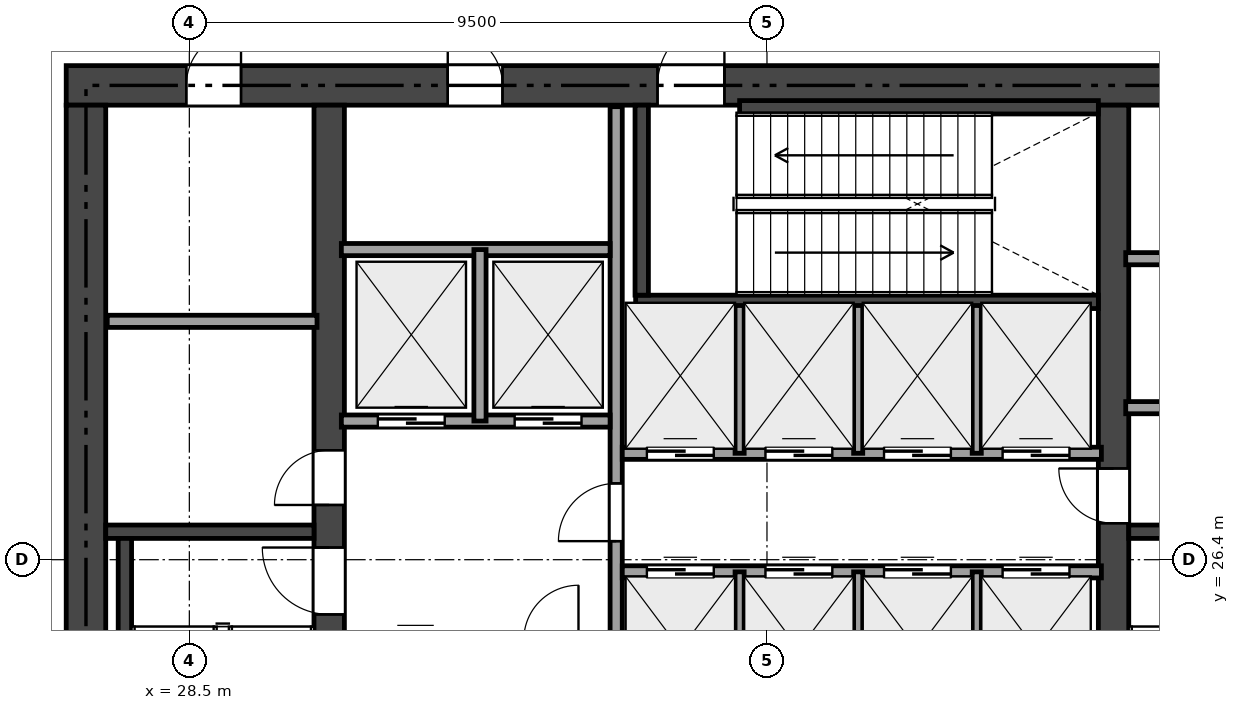
"""IFC4 building model, lengths in metres.
Left out: names, types, materials, properties, quantities, classifications, styles, units other than length and angle.
Written with IfcOpenShell. Run it as: python <this file> out.ifc"""

import sys

from ifc_helpers import new_model, si_unit, direction, frame, frame_2d, origin, place, context, subcontext, project, spatial, rectangle, extrude, element, fill, save


model = new_model("IFC4")
c1 = context("Model", 3, precision=1e-05, world=origin(), true_north=direction((0.0, 1.0)))
c2 = subcontext(c1, "Body", "Model", "MODEL_VIEW")
j1 = project(units=[si_unit("LENGTHUNIT", "METRE"), si_unit("PLANEANGLEUNIT", "RADIAN")], contexts=[c1])
p1 = place(None, origin())
s1 = spatial("IfcSite", under=j1, at=p1, CompositionType="ELEMENT")
p2 = place(p1, origin())
s2 = spatial("IfcBuilding", under=s1, at=p2, CompositionType="ELEMENT")
p3 = place(p2, origin())
s3 = spatial("IfcBuildingStorey", under=s2, at=p3, CompositionType="ELEMENT", Elevation=0.0)
p4 = place(p3, frame((26.475, 34.2, 0.0), z_axis=(0.0, 0.0, 1.0), x_axis=(1.0, 0.0, 0.0)))
e1 = element("IfcWall", 1, at=p4, inside=s3, PredefinedType="SHEAR", context=c2, shape_type="SweptSolid", body=[
    extrude(rectangle(XDim=21.45, YDim=0.65, at=frame_2d((10.725, 0.0))), origin(), (0.0, 0.0, 1.0), 5.05),
])
p5 = place(p4, frame((9.725, 0.0, 0.0)))
e2 = element("IfcOpeningElement", 2, at=p5, cuts=e1, PredefinedType="OPENING", context=c2, shape_type="SweptSolid", body=[
    extrude(rectangle(XDim=1.1, YDim=2.15, at=frame_2d((0.55, 1.075))), frame((0.0, 0.335, 0.0), z_axis=(0.0, -1.0, 0.0), x_axis=(1.0, 0.0, 0.0)), (0.0, 0.0, 1.0), 0.67),
])
p6 = place(p4, frame((1.975, 0.0, 0.0)))
e3 = element("IfcOpeningElement", 3, at=p6, cuts=e1, PredefinedType="OPENING", context=c2, shape_type="SweptSolid", body=[
    extrude(rectangle(XDim=0.9, YDim=2.1, at=frame_2d((0.45, 1.05))), frame((0.0, 0.335, 0.0), z_axis=(0.0, -1.0, 0.0), x_axis=(1.0, 0.0, 0.0)), (0.0, 0.0, 1.0), 0.67),
])
p7 = place(p4, frame((6.275, 0.0, 0.0)))
e4 = element("IfcOpeningElement", 4, at=p7, cuts=e1, PredefinedType="OPENING", context=c2, shape_type="SweptSolid", body=[
    extrude(rectangle(XDim=0.9, YDim=2.1, at=frame_2d((0.45, 1.05))), frame((0.0, 0.335, 0.0), z_axis=(0.0, -1.0, 0.0), x_axis=(1.0, 0.0, 0.0)), (0.0, 0.0, 1.0), 0.67),
])
p8 = place(p3, frame((26.8, 18.925, 0.0), z_axis=(0.0, 0.0, 1.0), x_axis=(0.0, 1.0, 0.0)))
e5 = element("IfcWall", 5, at=p8, inside=s3, PredefinedType="SHEAR", context=c2, shape_type="SweptSolid", body=[
    extrude(rectangle(XDim=14.95, YDim=0.65, at=frame_2d((7.475, 0.0))), origin(), (0.0, 0.0, 1.0), 5.05),
])
p9 = place(p3, frame((30.8, 18.925, 0.0), z_axis=(0.0, 0.0, 1.0), x_axis=(0.0, 1.0, 0.0)))
e6 = element("IfcWall", 6, at=p9, inside=s3, PredefinedType="SHEAR", context=c2, shape_type="SweptSolid", body=[
    extrude(rectangle(XDim=14.95, YDim=0.5, at=frame_2d((7.475, 0.0))), origin(), (0.0, 0.0, 1.0), 5.05),
])
p10 = place(p9, frame((6.575, 0.0, 0.0)))
e7 = element("IfcOpeningElement", 7, at=p10, cuts=e6, PredefinedType="OPENING", context=c2, shape_type="SweptSolid", body=[
    extrude(rectangle(XDim=1.1, YDim=2.15, at=frame_2d((0.55, 1.075))), frame((0.0, 0.26, 0.0), z_axis=(0.0, -1.0, 0.0), x_axis=(1.0, 0.0, 0.0)), (0.0, 0.0, 1.0), 0.52),
])
p11 = place(p9, frame((8.375, 0.0, 0.0)))
e8 = element("IfcOpeningElement", 8, at=p11, cuts=e6, PredefinedType="OPENING", context=c2, shape_type="SweptSolid", body=[
    extrude(rectangle(XDim=0.9, YDim=2.1, at=frame_2d((0.45, 1.05))), frame((0.0, 0.26, 0.0), z_axis=(0.0, -1.0, 0.0), x_axis=(1.0, 0.0, 0.0)), (0.0, 0.0, 1.0), 0.52),
])
p12 = place(p3, frame((43.7, 18.925, 0.0), z_axis=(0.0, 0.0, 1.0), x_axis=(0.0, 1.0, 0.0)))
e9 = element("IfcWall", 9, at=p12, inside=s3, PredefinedType="SHEAR", context=c2, shape_type="SweptSolid", body=[
    extrude(rectangle(XDim=14.95, YDim=0.5, at=frame_2d((7.475, 0.0))), origin(), (0.0, 0.0, 1.0), 5.05),
])
p13 = place(p12, frame((8.075, 0.0, 0.0)))
e10 = element("IfcOpeningElement", 10, at=p13, cuts=e9, PredefinedType="OPENING", context=c2, shape_type="SweptSolid", body=[
    extrude(rectangle(XDim=0.9, YDim=2.1, at=frame_2d((0.45, 1.05))), frame((0.0, 0.26, 0.0), z_axis=(0.0, -1.0, 0.0), x_axis=(1.0, 0.0, 0.0)), (0.0, 0.0, 1.0), 0.52),
])
p14 = place(p3, frame((27.125, 26.86, 0.0), z_axis=(0.0, 0.0, 1.0), x_axis=(1.0, 0.0, 0.0)))
e11 = element("IfcWall", 11, at=p14, inside=s3, PredefinedType="SHEAR", context=c2, shape_type="SweptSolid", body=[
    extrude(rectangle(XDim=3.425, YDim=0.22, at=frame_2d((1.712, 0.0))), origin(), (0.0, 0.0, 1.0), 5.05),
])
p15 = place(p3, frame((27.44, 19.35, 0.0), z_axis=(0.0, 0.0, 1.0), x_axis=(0.0, 1.0, 0.0)))
e12 = element("IfcWall", 12, at=p15, inside=s3, PredefinedType="SHEAR", context=c2, shape_type="SweptSolid", body=[
    extrude(rectangle(XDim=7.4, YDim=0.22, at=frame_2d((3.7, 0.0))), origin(), (0.0, 0.0, 1.0), 5.05),
])
p16 = place(p3, frame((43.95, 26.86, 0.0), z_axis=(0.0, 0.0, 1.0), x_axis=(1.0, 0.0, 0.0)))
e13 = element("IfcWall", 13, at=p16, inside=s3, PredefinedType="SHEAR", context=c2, shape_type="SweptSolid", body=[
    extrude(rectangle(XDim=3.325, YDim=0.22, at=frame_2d((1.663, 0.0))), origin(), (0.0, 0.0, 1.0), 5.05),
])
p17 = place(p3, frame((35.84, 30.64, 0.0), z_axis=(0.0, 0.0, 1.0), x_axis=(1.0, 0.0, 0.0)))
e14 = element("IfcWall", 14, at=p17, inside=s3, PredefinedType="SHEAR", context=c2, shape_type="SweptSolid", body=[
    extrude(rectangle(XDim=7.61, YDim=0.22, at=frame_2d((3.805, 0.0))), origin(), (0.0, 0.0, 1.0), 5.05),
])
p18 = place(p3, frame((35.94, 30.75, 0.0), z_axis=(0.0, 0.0, 1.0), x_axis=(0.0, 1.0, 0.0)))
e15 = element("IfcWall", 15, at=p18, inside=s3, PredefinedType="SHEAR", context=c2, shape_type="SweptSolid", body=[
    extrude(rectangle(XDim=3.125, YDim=0.22, at=frame_2d((1.562, 0.0))), origin(), (0.0, 0.0, 1.0), 5.05),
])
p19 = place(p3, frame((37.55, 33.84, 0.0), z_axis=(0.0, 0.0, 1.0), x_axis=(1.0, 0.0, 0.0)))
e16 = element("IfcWall", 16, at=p19, inside=s3, PredefinedType="SHEAR", context=c2, shape_type="SweptSolid", body=[
    extrude(rectangle(XDim=5.9, YDim=0.22, at=frame_2d((2.95, 0.0))), origin(), (0.0, 0.0, 1.0), 5.05),
])
p20 = place(p3, frame((27.15, 30.32, 0.0), z_axis=(0.0, 0.0, 1.0), x_axis=(1.0, 0.0, 0.0)))
e17 = element("IfcWall", 17, at=p20, inside=s3, PredefinedType="SOLIDWALL", context=c2, shape_type="SweptSolid", body=[
    extrude(rectangle(XDim=3.45, YDim=0.2, at=frame_2d((1.725, 0.0))), origin(), (0.0, 0.0, 1.0), 5.05),
])
p21 = place(p3, frame((43.9, 28.9, 0.0), z_axis=(0.0, 0.0, 1.0), x_axis=(1.0, 0.0, 0.0)))
e18 = element("IfcWall", 18, at=p21, inside=s3, PredefinedType="SOLIDWALL", context=c2, shape_type="SweptSolid", body=[
    extrude(rectangle(XDim=3.35, YDim=0.2, at=frame_2d((1.675, 0.0))), origin(), (0.0, 0.0, 1.0), 5.05),
])
p22 = place(p21, frame((1.15, 0.0, 0.0)))
e19 = element("IfcOpeningElement", 19, at=p22, cuts=e18, PredefinedType="OPENING", context=c2, shape_type="SweptSolid", body=[
    extrude(rectangle(XDim=0.9, YDim=2.1, at=frame_2d((0.45, 1.05))), frame((0.0, 0.11, 0.0), z_axis=(0.0, -1.0, 0.0), x_axis=(1.0, 0.0, 0.0)), (0.0, 0.0, 1.0), 0.22),
])
p23 = place(p3, frame((43.9, 31.35, 0.0), z_axis=(0.0, 0.0, 1.0), x_axis=(1.0, 0.0, 0.0)))
e20 = element("IfcWall", 20, at=p23, inside=s3, PredefinedType="SOLIDWALL", context=c2, shape_type="SweptSolid", body=[
    extrude(rectangle(XDim=3.35, YDim=0.2, at=frame_2d((1.675, 0.0))), origin(), (0.0, 0.0, 1.0), 5.05),
])
p24 = place(p3, frame((35.52, 18.95, 0.0), z_axis=(0.0, 0.0, 1.0), x_axis=(0.0, 1.0, 0.0)))
e21 = element("IfcWall", 21, at=p24, inside=s3, PredefinedType="SOLIDWALL", context=c2, shape_type="SweptSolid", body=[
    extrude(rectangle(XDim=14.9, YDim=0.2, at=frame_2d((7.45, 0.0))), origin(), (0.0, 0.0, 1.0), 4.571),
])
p25 = place(p24, frame((7.755, 0.0, 0.0)))
e22 = element("IfcOpeningElement", 22, at=p25, cuts=e21, PredefinedType="OPENING", context=c2, shape_type="SweptSolid", body=[
    extrude(rectangle(XDim=0.95, YDim=2.15, at=frame_2d((0.475, 1.075))), frame((0.0, 0.11, 0.0), z_axis=(0.0, -1.0, 0.0), x_axis=(1.0, 0.0, 0.0)), (0.0, 0.0, 1.0), 0.22),
])
p26 = place(p24, frame((0.6, 0.0, 0.0)))
e23 = element("IfcOpeningElement", 23, at=p26, cuts=e21, PredefinedType="OPENING", context=c2, shape_type="SweptSolid", body=[
    extrude(rectangle(XDim=0.9, YDim=2.1, at=frame_2d((0.45, 1.05))), frame((0.0, 0.11, 0.0), z_axis=(0.0, -1.0, 0.0), x_axis=(1.0, 0.0, 0.0)), (0.0, 0.0, 1.0), 0.22),
])
p27 = place(p3, frame((31.0, 28.68, 0.0), z_axis=(0.0, 0.0, 1.0), x_axis=(1.0, 0.0, 0.0)))
e24 = element("IfcWall", 24, at=p27, inside=s3, PredefinedType="SOLIDWALL", context=c2, shape_type="SweptSolid", body=[
    extrude(rectangle(XDim=4.42, YDim=0.2, at=frame_2d((2.21, 0.0))), origin(), (0.0, 0.0, 1.0), 5.05),
])
p28 = place(p27, frame((0.6, 0.0, 0.0)))
e25 = element("IfcOpeningElement", 25, at=p28, cuts=e24, PredefinedType="OPENING", context=c2, shape_type="SweptSolid", body=[
    extrude(rectangle(XDim=1.1, YDim=2.15, at=frame_2d((0.55, 1.075))), frame((0.0, 0.11, 0.0), z_axis=(0.0, -1.0, 0.0), x_axis=(1.0, 0.0, 0.0)), (0.0, 0.0, 1.0), 0.22),
])
p29 = place(p27, frame((2.85, 0.0, 0.0)))
e26 = element("IfcOpeningElement", 26, at=p29, cuts=e24, PredefinedType="OPENING", context=c2, shape_type="SweptSolid", body=[
    extrude(rectangle(XDim=1.1, YDim=2.15, at=frame_2d((0.55, 1.075))), frame((0.0, 0.11, 0.0), z_axis=(0.0, -1.0, 0.0), x_axis=(1.0, 0.0, 0.0)), (0.0, 0.0, 1.0), 0.22),
])
p30 = place(p3, frame((31.0, 31.5, 0.0), z_axis=(0.0, 0.0, 1.0), x_axis=(1.0, 0.0, 0.0)))
e27 = element("IfcWall", 27, at=p30, inside=s3, PredefinedType="SOLIDWALL", context=c2, shape_type="SweptSolid", body=[
    extrude(rectangle(XDim=4.42, YDim=0.2, at=frame_2d((2.21, 0.0))), origin(), (0.0, 0.0, 1.0), 5.05),
])
p31 = place(p3, frame((33.28, 28.68, 0.0), z_axis=(0.0, 0.0, 1.0), x_axis=(0.0, 1.0, 0.0)))
e28 = element("IfcWall", 28, at=p31, inside=s3, PredefinedType="SOLIDWALL", context=c2, shape_type="SweptSolid", body=[
    extrude(rectangle(XDim=2.82, YDim=0.2, at=frame_2d((1.41, 0.0))), origin(), (0.0, 0.0, 1.0), 5.05),
])
p32 = place(p3, frame((35.62, 28.15, 0.0), z_axis=(0.0, 0.0, 1.0), x_axis=(1.0, 0.0, 0.0)))
e29 = element("IfcWall", 29, at=p32, inside=s3, PredefinedType="SOLIDWALL", context=c2, shape_type="SweptSolid", body=[
    extrude(rectangle(XDim=7.88, YDim=0.2, at=frame_2d((3.94, 0.0))), origin(), (0.0, 0.0, 1.0), 5.05),
])
p33 = place(p32, frame((0.405, 0.0, 0.0)))
e30 = element("IfcOpeningElement", 30, at=p33, cuts=e29, PredefinedType="OPENING", context=c2, shape_type="SweptSolid", body=[
    extrude(rectangle(XDim=1.1, YDim=2.15, at=frame_2d((0.55, 1.075))), frame((0.0, 0.11, 0.0), z_axis=(0.0, -1.0, 0.0), x_axis=(1.0, 0.0, 0.0)), (0.0, 0.0, 1.0), 0.22),
])
p34 = place(p32, frame((2.355, 0.0, 0.0)))
e31 = element("IfcOpeningElement", 31, at=p34, cuts=e29, PredefinedType="OPENING", context=c2, shape_type="SweptSolid", body=[
    extrude(rectangle(XDim=1.1, YDim=2.15, at=frame_2d((0.55, 1.075))), frame((0.0, 0.11, 0.0), z_axis=(0.0, -1.0, 0.0), x_axis=(1.0, 0.0, 0.0)), (0.0, 0.0, 1.0), 0.22),
])
p35 = place(p32, frame((4.305, 0.0, 0.0)))
e32 = element("IfcOpeningElement", 32, at=p35, cuts=e29, PredefinedType="OPENING", context=c2, shape_type="SweptSolid", body=[
    extrude(rectangle(XDim=1.1, YDim=2.15, at=frame_2d((0.55, 1.075))), frame((0.0, 0.11, 0.0), z_axis=(0.0, -1.0, 0.0), x_axis=(1.0, 0.0, 0.0)), (0.0, 0.0, 1.0), 0.22),
])
p36 = place(p32, frame((6.255, 0.0, 0.0)))
e33 = element("IfcOpeningElement", 33, at=p36, cuts=e29, PredefinedType="OPENING", context=c2, shape_type="SweptSolid", body=[
    extrude(rectangle(XDim=1.1, YDim=2.15, at=frame_2d((0.55, 1.075))), frame((0.0, 0.11, 0.0), z_axis=(0.0, -1.0, 0.0), x_axis=(1.0, 0.0, 0.0)), (0.0, 0.0, 1.0), 0.22),
])
p37 = place(p3, frame((35.62, 26.2, 0.0), z_axis=(0.0, 0.0, 1.0), x_axis=(1.0, 0.0, 0.0)))
e34 = element("IfcWall", 34, at=p37, inside=s3, PredefinedType="SOLIDWALL", context=c2, shape_type="SweptSolid", body=[
    extrude(rectangle(XDim=7.88, YDim=0.2, at=frame_2d((3.94, 0.0))), origin(), (0.0, 0.0, 1.0), 5.05),
])
p38 = place(p37, frame((0.405, 0.0, 0.0)))
e35 = element("IfcOpeningElement", 35, at=p38, cuts=e34, PredefinedType="OPENING", context=c2, shape_type="SweptSolid", body=[
    extrude(rectangle(XDim=1.1, YDim=2.15, at=frame_2d((0.55, 1.075))), frame((0.0, 0.11, 0.0), z_axis=(0.0, -1.0, 0.0), x_axis=(1.0, 0.0, 0.0)), (0.0, 0.0, 1.0), 0.22),
])
p39 = place(p37, frame((2.355, 0.0, 0.0)))
e36 = element("IfcOpeningElement", 36, at=p39, cuts=e34, PredefinedType="OPENING", context=c2, shape_type="SweptSolid", body=[
    extrude(rectangle(XDim=1.1, YDim=2.15, at=frame_2d((0.55, 1.075))), frame((0.0, 0.11, 0.0), z_axis=(0.0, -1.0, 0.0), x_axis=(1.0, 0.0, 0.0)), (0.0, 0.0, 1.0), 0.22),
])
p40 = place(p37, frame((4.305, 0.0, 0.0)))
e37 = element("IfcOpeningElement", 37, at=p40, cuts=e34, PredefinedType="OPENING", context=c2, shape_type="SweptSolid", body=[
    extrude(rectangle(XDim=1.1, YDim=2.15, at=frame_2d((0.55, 1.075))), frame((0.0, 0.11, 0.0), z_axis=(0.0, -1.0, 0.0), x_axis=(1.0, 0.0, 0.0)), (0.0, 0.0, 1.0), 0.22),
])
p41 = place(p37, frame((6.255, 0.0, 0.0)))
e38 = element("IfcOpeningElement", 38, at=p41, cuts=e34, PredefinedType="OPENING", context=c2, shape_type="SweptSolid", body=[
    extrude(rectangle(XDim=1.1, YDim=2.15, at=frame_2d((0.55, 1.075))), frame((0.0, 0.11, 0.0), z_axis=(0.0, -1.0, 0.0), x_axis=(1.0, 0.0, 0.0)), (0.0, 0.0, 1.0), 0.22),
])
for number, where, z_axis, x_axis in (
    (39, (37.55, 28.15, 0.0), (0.0, 0.0, 1.0), (0.0, 1.0, 0.0)),
    (40, (39.5, 28.15, 0.0), (0.0, 0.0, 1.0), (0.0, 1.0, 0.0)),
    (41, (41.45, 28.15, 0.0), (0.0, 0.0, 1.0), (0.0, 1.0, 0.0)),
):
    element("IfcWall", number, at=place(p3, frame(where, z_axis=z_axis, x_axis=x_axis)), inside=s3, PredefinedType="PARTITIONING", context=c2, shape_type="SweptSolid", body=[
        extrude(rectangle(XDim=2.43, YDim=0.15, at=frame_2d((1.215, 0.0))), origin(), (0.0, 0.0, 1.0), 5.05),
    ])
for number, where, z_axis, x_axis in (
    (42, (37.55, 23.65, 0.0), (0.0, 0.0, 1.0), (0.0, 1.0, 0.0)),
    (43, (39.5, 23.65, 0.0), (0.0, 0.0, 1.0), (0.0, 1.0, 0.0)),
    (44, (41.45, 23.65, 0.0), (0.0, 0.0, 1.0), (0.0, 1.0, 0.0)),
):
    element("IfcWall", number, at=place(p3, frame(where, z_axis=z_axis, x_axis=x_axis)), inside=s3, PredefinedType="PARTITIONING", context=c2, shape_type="SweptSolid", body=[
        extrude(rectangle(XDim=2.55, YDim=0.15, at=frame_2d((1.275, 0.0))), origin(), (0.0, 0.0, 1.0), 4.571),
    ])
p42 = place(p10, origin())
e45 = element("IfcDoor", 45, at=p42, inside=s3, OperationType="SINGLE_SWING_RIGHT", PredefinedType="DOOR", context=c2, shape_type="SweptSolid", body=[
    extrude(rectangle(XDim=1.1, YDim=2.15, at=frame_2d((0.55, 1.075))), frame((0.0, 0.025, 0.0), z_axis=(0.0, -1.0, 0.0), x_axis=(1.0, 0.0, 0.0)), (0.0, 0.0, 1.0), 0.05),
])
fill(e7, e45)
p43 = place(p5, origin())
e46 = element("IfcDoor", 46, at=p43, inside=s3, OperationType="SINGLE_SWING_RIGHT", PredefinedType="DOOR", context=c2, shape_type="SweptSolid", body=[
    extrude(rectangle(XDim=1.1, YDim=2.15, at=frame_2d((0.55, 1.075))), frame((0.0, 0.025, 0.0), z_axis=(0.0, -1.0, 0.0), x_axis=(1.0, 0.0, 0.0)), (0.0, 0.0, 1.0), 0.05),
])
fill(e2, e46)
p44 = place(p25, origin())
e47 = element("IfcDoor", 47, at=p44, inside=s3, OperationType="SINGLE_SWING_LEFT", PredefinedType="DOOR", context=c2, shape_type="SweptSolid", body=[
    extrude(rectangle(XDim=0.95, YDim=2.15, at=frame_2d((0.475, 1.075))), frame((0.0, 0.025, 0.0), z_axis=(0.0, -1.0, 0.0), x_axis=(1.0, 0.0, 0.0)), (0.0, 0.0, 1.0), 0.05),
])
fill(e22, e47)
p45 = place(p13, origin())
e48 = element("IfcDoor", 48, at=p45, inside=s3, OperationType="SINGLE_SWING_RIGHT", PredefinedType="DOOR", context=c2, shape_type="SweptSolid", body=[
    extrude(rectangle(XDim=0.9, YDim=2.1, at=frame_2d((0.45, 1.05))), frame((0.0, 0.025, 0.0), z_axis=(0.0, -1.0, 0.0), x_axis=(1.0, 0.0, 0.0)), (0.0, 0.0, 1.0), 0.05),
])
fill(e10, e48)
p46 = place(p11, origin())
e49 = element("IfcDoor", 49, at=p46, inside=s3, OperationType="SINGLE_SWING_LEFT", PredefinedType="DOOR", context=c2, shape_type="SweptSolid", body=[
    extrude(rectangle(XDim=0.9, YDim=2.1, at=frame_2d((0.45, 1.05))), frame((0.0, 0.025, 0.0), z_axis=(0.0, -1.0, 0.0), x_axis=(1.0, 0.0, 0.0)), (0.0, 0.0, 1.0), 0.05),
])
fill(e8, e49)
p47 = place(p6, origin())
e50 = element("IfcDoor", 50, at=p47, inside=s3, OperationType="SINGLE_SWING_RIGHT", PredefinedType="DOOR", context=c2, shape_type="SweptSolid", body=[
    extrude(rectangle(XDim=0.9, YDim=2.1, at=frame_2d((0.45, 1.05))), frame((0.0, 0.025, 0.0), z_axis=(0.0, -1.0, 0.0), x_axis=(1.0, 0.0, 0.0)), (0.0, 0.0, 1.0), 0.05),
])
fill(e3, e50)
p48 = place(p7, origin())
e51 = element("IfcDoor", 51, at=p48, inside=s3, OperationType="SINGLE_SWING_LEFT", PredefinedType="DOOR", context=c2, shape_type="SweptSolid", body=[
    extrude(rectangle(XDim=0.9, YDim=2.1, at=frame_2d((0.45, 1.05))), frame((0.0, 0.025, 0.0), z_axis=(0.0, -1.0, 0.0), x_axis=(1.0, 0.0, 0.0)), (0.0, 0.0, 1.0), 0.05),
])
fill(e4, e51)
p49 = place(p28, origin())
e52 = element("IfcDoor", 52, at=p49, inside=s3, OperationType="SLIDING_TO_LEFT", PredefinedType="DOOR", context=c2, shape_type="SweptSolid", body=[
    extrude(rectangle(XDim=1.1, YDim=2.15, at=frame_2d((0.55, 1.075))), frame((0.0, 0.025, 0.0), z_axis=(0.0, -1.0, 0.0), x_axis=(1.0, 0.0, 0.0)), (0.0, 0.0, 1.0), 0.05),
])
fill(e25, e52)
p50 = place(p29, origin())
e53 = element("IfcDoor", 53, at=p50, inside=s3, OperationType="SLIDING_TO_LEFT", PredefinedType="DOOR", context=c2, shape_type="SweptSolid", body=[
    extrude(rectangle(XDim=1.1, YDim=2.15, at=frame_2d((0.55, 1.075))), frame((0.0, 0.025, 0.0), z_axis=(0.0, -1.0, 0.0), x_axis=(1.0, 0.0, 0.0)), (0.0, 0.0, 1.0), 0.05),
])
fill(e26, e53)
p51 = place(p38, origin())
e54 = element("IfcDoor", 54, at=p51, inside=s3, OperationType="SLIDING_TO_LEFT", PredefinedType="DOOR", context=c2, shape_type="SweptSolid", body=[
    extrude(rectangle(XDim=1.1, YDim=2.15, at=frame_2d((0.55, 1.075))), frame((0.0, 0.025, 0.0), z_axis=(0.0, -1.0, 0.0), x_axis=(1.0, 0.0, 0.0)), (0.0, 0.0, 1.0), 0.05),
])
fill(e35, e54)
p52 = place(p33, origin())
e55 = element("IfcDoor", 55, at=p52, inside=s3, OperationType="SLIDING_TO_LEFT", PredefinedType="DOOR", context=c2, shape_type="SweptSolid", body=[
    extrude(rectangle(XDim=1.1, YDim=2.15, at=frame_2d((0.55, 1.075))), frame((0.0, 0.025, 0.0), z_axis=(0.0, -1.0, 0.0), x_axis=(1.0, 0.0, 0.0)), (0.0, 0.0, 1.0), 0.05),
])
fill(e30, e55)
p53 = place(p39, origin())
e56 = element("IfcDoor", 56, at=p53, inside=s3, OperationType="SLIDING_TO_LEFT", PredefinedType="DOOR", context=c2, shape_type="SweptSolid", body=[
    extrude(rectangle(XDim=1.1, YDim=2.15, at=frame_2d((0.55, 1.075))), frame((0.0, 0.025, 0.0), z_axis=(0.0, -1.0, 0.0), x_axis=(1.0, 0.0, 0.0)), (0.0, 0.0, 1.0), 0.05),
])
fill(e36, e56)
p54 = place(p34, origin())
e57 = element("IfcDoor", 57, at=p54, inside=s3, OperationType="SLIDING_TO_LEFT", PredefinedType="DOOR", context=c2, shape_type="SweptSolid", body=[
    extrude(rectangle(XDim=1.1, YDim=2.15, at=frame_2d((0.55, 1.075))), frame((0.0, 0.025, 0.0), z_axis=(0.0, -1.0, 0.0), x_axis=(1.0, 0.0, 0.0)), (0.0, 0.0, 1.0), 0.05),
])
fill(e31, e57)
p55 = place(p40, origin())
e58 = element("IfcDoor", 58, at=p55, inside=s3, OperationType="SLIDING_TO_LEFT", PredefinedType="DOOR", context=c2, shape_type="SweptSolid", body=[
    extrude(rectangle(XDim=1.1, YDim=2.15, at=frame_2d((0.55, 1.075))), frame((0.0, 0.025, 0.0), z_axis=(0.0, -1.0, 0.0), x_axis=(1.0, 0.0, 0.0)), (0.0, 0.0, 1.0), 0.05),
])
fill(e37, e58)
p56 = place(p35, origin())
e59 = element("IfcDoor", 59, at=p56, inside=s3, OperationType="SLIDING_TO_LEFT", PredefinedType="DOOR", context=c2, shape_type="SweptSolid", body=[
    extrude(rectangle(XDim=1.1, YDim=2.15, at=frame_2d((0.55, 1.075))), frame((0.0, 0.025, 0.0), z_axis=(0.0, -1.0, 0.0), x_axis=(1.0, 0.0, 0.0)), (0.0, 0.0, 1.0), 0.05),
])
fill(e32, e59)
p57 = place(p41, origin())
e60 = element("IfcDoor", 60, at=p57, inside=s3, OperationType="SLIDING_TO_LEFT", PredefinedType="DOOR", context=c2, shape_type="SweptSolid", body=[
    extrude(rectangle(XDim=1.1, YDim=2.15, at=frame_2d((0.55, 1.075))), frame((0.0, 0.025, 0.0), z_axis=(0.0, -1.0, 0.0), x_axis=(1.0, 0.0, 0.0)), (0.0, 0.0, 1.0), 0.05),
])
fill(e38, e60)
p58 = place(p36, origin())
e61 = element("IfcDoor", 61, at=p58, inside=s3, OperationType="SLIDING_TO_LEFT", PredefinedType="DOOR", context=c2, shape_type="SweptSolid", body=[
    extrude(rectangle(XDim=1.1, YDim=2.15, at=frame_2d((0.55, 1.075))), frame((0.0, 0.025, 0.0), z_axis=(0.0, -1.0, 0.0), x_axis=(1.0, 0.0, 0.0)), (0.0, 0.0, 1.0), 0.05),
])
fill(e33, e61)
save(model, sys.argv[1])
